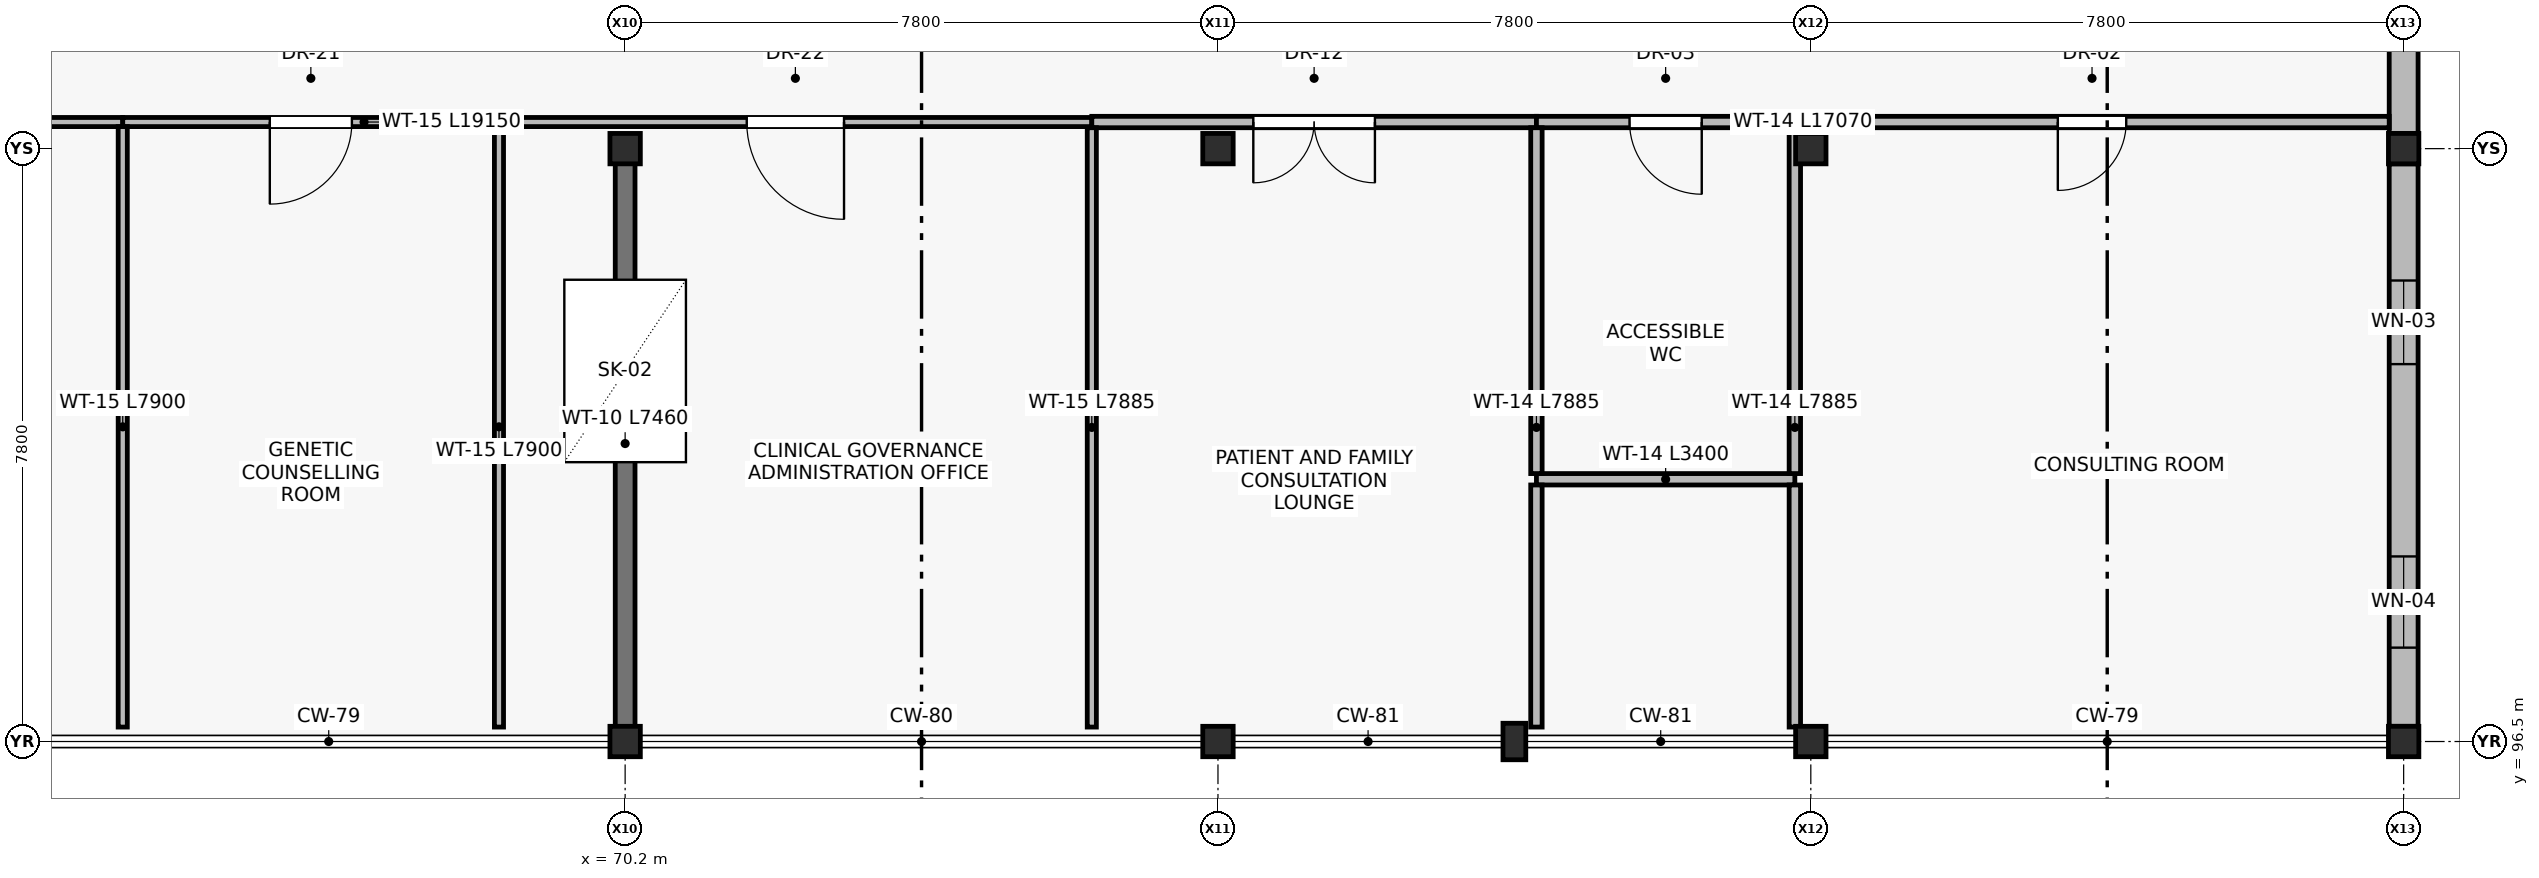
"""IFC4 building model, lengths in metres.
Left out: names, types, materials, properties, quantities, classifications, styles, units other than length and angle.
Written with IfcOpenShell. Run it as: python <this file> out.ifc"""

import sys

from ifc_helpers import new_model, si_unit, direction, frame, frame_2d, origin, origin_2d, place, context, subcontext, project, spatial, rectangle, extrude, element, fill, save


model = new_model("IFC4")
c1 = context("Model", 3, precision=1e-05, world=origin(), true_north=direction((0.0, 1.0)))
c2 = subcontext(c1, "Body", "Model", "MODEL_VIEW")
j1 = project(units=[si_unit("LENGTHUNIT", "METRE"), si_unit("PLANEANGLEUNIT", "RADIAN")], contexts=[c1])
p1 = place(None, origin())
s1 = spatial("IfcSite", under=j1, at=p1, CompositionType="ELEMENT")
p2 = place(p1, origin())
s2 = spatial("IfcBuilding", under=s1, at=p2, CompositionType="ELEMENT")
p3 = place(p2, frame((0.0, 0.0, 23.1)))
s3 = spatial("IfcBuildingStorey", under=s2, at=p3, CompositionType="ELEMENT", Elevation=23.1)
for number, where, z_axis, x_axis in (
    (1, (70.2, 96.5, 0.0), (0.0, 0.0, 1.0), (1.0, 0.0, 0.0)),
    (2, (70.2, 104.3, 0.0), (0.0, 0.0, 1.0), (1.0, 0.0, 0.0)),
    (3, (78.0, 96.5, 0.0), (0.0, 0.0, 1.0), (1.0, 0.0, 0.0)),
    (4, (78.0, 104.3, 0.0), (0.0, 0.0, 1.0), (1.0, 0.0, 0.0)),
    (5, (85.8, 96.5, 0.0), (0.0, 0.0, 1.0), (1.0, 0.0, 0.0)),
    (6, (85.8, 104.3, 0.0), (0.0, 0.0, 1.0), (1.0, 0.0, 0.0)),
    (7, (93.6, 96.5, 0.0), (0.0, 0.0, 1.0), (1.0, 0.0, 0.0)),
    (8, (93.6, 104.3, 0.0), (0.0, 0.0, 1.0), (1.0, 0.0, 0.0)),
):
    element("IfcColumn", number, at=place(p3, frame(where, z_axis=z_axis, x_axis=x_axis)), inside=s3, PredefinedType="COLUMN", context=c2, shape_type="SweptSolid", body=[
        extrude(rectangle(XDim=0.4, YDim=0.4, at=origin_2d()), origin(), (0.0, 0.0, 1.0), 4.2),
    ])
p4 = place(p3, frame((81.9, 96.5, 0.0), z_axis=(0.0, 0.0, 1.0), x_axis=(1.0, 0.0, 0.0)))
e9 = element("IfcColumn", 9, at=p4, inside=s3, PredefinedType="PILASTER", context=c2, shape_type="SweptSolid", body=[
    extrude(rectangle(XDim=0.3, YDim=0.48, at=origin_2d()), origin(), (0.0, 0.0, 1.0), 4.2),
])
p5 = place(p3, frame((93.6, 104.1, 0.0), z_axis=(0.0, 0.0, 1.0), x_axis=(0.0, -1.0, 0.0)))
e10 = element("IfcWall", 10, at=p5, inside=s3, PredefinedType="STANDARD", context=c2, shape_type="SweptSolid", body=[
    extrude(rectangle(XDim=7.4, YDim=0.38, at=frame_2d((3.7, 0.0))), origin(), (0.0, 0.0, 1.0), 3.65),
])
p6 = place(p5, frame((1.535, 0.0, 0.9)))
e11 = element("IfcOpeningElement", 11, at=p6, cuts=e10, PredefinedType="OPENING", context=c2, shape_type="SweptSolid", body=[
    extrude(rectangle(XDim=1.1, YDim=1.6, at=frame_2d((0.55, 0.8))), frame((0.0, 0.2, 0.0), z_axis=(0.0, -1.0, 0.0), x_axis=(1.0, 0.0, 0.0)), (0.0, 0.0, 1.0), 0.4),
])
p7 = place(p5, frame((5.165, 0.0, 0.9)))
e12 = element("IfcOpeningElement", 12, at=p7, cuts=e10, PredefinedType="OPENING", context=c2, shape_type="SweptSolid", body=[
    extrude(rectangle(XDim=1.2, YDim=1.5, at=frame_2d((0.6, 0.75))), frame((0.0, 0.2, 0.0), z_axis=(0.0, -1.0, 0.0), x_axis=(1.0, 0.0, 0.0)), (0.0, 0.0, 1.0), 0.4),
])
p8 = place(p3, frame((93.6, 108.0, 0.0), z_axis=(0.0, 0.0, 1.0), x_axis=(0.0, -1.0, 0.0)))
e13 = element("IfcWall", 13, at=p8, inside=s3, PredefinedType="STANDARD", context=c2, shape_type="SweptSolid", body=[
    extrude(rectangle(XDim=3.5, YDim=0.38, at=frame_2d((1.75, 0.0))), origin(), (0.0, 0.0, 1.0), 3.65),
])
p9 = place(p8, frame((1.15, 0.0, 0.9)))
e14 = element("IfcOpeningElement", 14, at=p9, cuts=e13, PredefinedType="OPENING", context=c2, shape_type="SweptSolid", body=[
    extrude(rectangle(XDim=1.2, YDim=2.1, at=frame_2d((0.6, 1.05))), frame((0.0, 0.2, 0.0), z_axis=(0.0, -1.0, 0.0), x_axis=(1.0, 0.0, 0.0)), (0.0, 0.0, 1.0), 0.4),
])
p10 = place(p3, frame((70.2, 96.69, 0.0), z_axis=(0.0, 0.0, 1.0), x_axis=(0.0, 1.0, 0.0)))
e15 = element("IfcWall", 15, at=p10, inside=s3, PredefinedType="SHEAR", context=c2, shape_type="SweptSolid", body=[
    extrude(rectangle(XDim=7.46, YDim=0.26, at=frame_2d((3.73, 0.0))), origin(), (0.0, 0.0, 1.0), 3.94),
])
p11 = place(p3, frame((63.59, 104.65, 0.0), z_axis=(0.0, 0.0, 1.0), x_axis=(-1.0, 0.0, 0.0)))
e16 = element("IfcWall", 16, at=p11, inside=s3, PredefinedType="PARTITIONING", context=c2, shape_type="SweptSolid", body=[
    extrude(rectangle(XDim=6.4, YDim=0.12, at=frame_2d((3.2, 0.0))), origin(), (0.0, 0.0, 1.0), 3.94),
])
p12 = place(p11, frame((2.74, 0.0, 0.0)))
e17 = element("IfcOpeningElement", 17, at=p12, cuts=e16, PredefinedType="OPENING", context=c2, shape_type="SweptSolid", body=[
    extrude(rectangle(XDim=0.92, YDim=2.15, at=frame_2d((0.46, 1.075))), frame((0.0, 0.07, 0.0), z_axis=(0.0, -1.0, 0.0), x_axis=(1.0, 0.0, 0.0)), (0.0, 0.0, 1.0), 0.14),
])
p13 = place(p3, frame((68.54, 104.65, 0.0), z_axis=(0.0, 0.0, 1.0), x_axis=(-1.0, 0.0, 0.0)))
e18 = element("IfcWall", 18, at=p13, inside=s3, PredefinedType="PARTITIONING", context=c2, shape_type="SweptSolid", body=[
    extrude(rectangle(XDim=4.95, YDim=0.12, at=frame_2d((2.475, 0.0))), origin(), (0.0, 0.0, 1.0), 3.94),
])
p14 = place(p13, frame((1.935, 0.0, 0.0)))
e19 = element("IfcOpeningElement", 19, at=p14, cuts=e18, PredefinedType="OPENING", context=c2, shape_type="SweptSolid", body=[
    extrude(rectangle(XDim=1.08, YDim=2.2, at=frame_2d((0.54, 1.1))), frame((0.0, 0.07, 0.0), z_axis=(0.0, -1.0, 0.0), x_axis=(1.0, 0.0, 0.0)), (0.0, 0.0, 1.0), 0.14),
])
p15 = place(p3, frame((76.34, 104.65, 0.0), z_axis=(0.0, 0.0, 1.0), x_axis=(-1.0, 0.0, 0.0)))
e20 = element("IfcWall", 20, at=p15, inside=s3, PredefinedType="PARTITIONING", context=c2, shape_type="SweptSolid", body=[
    extrude(rectangle(XDim=7.8, YDim=0.12, at=frame_2d((3.9, 0.0))), origin(), (0.0, 0.0, 1.0), 3.94),
])
p16 = place(p15, frame((3.26, 0.0, 0.0)))
e21 = element("IfcOpeningElement", 21, at=p16, cuts=e20, PredefinedType="OPENING", context=c2, shape_type="SweptSolid", body=[
    extrude(rectangle(XDim=1.28, YDim=2.25, at=frame_2d((0.64, 1.125))), frame((0.0, 0.07, 0.0), z_axis=(0.0, -1.0, 0.0), x_axis=(1.0, 0.0, 0.0)), (0.0, 0.0, 1.0), 0.14),
])
p17 = place(p3, frame((82.19, 104.65, 0.0), z_axis=(0.0, 0.0, 1.0), x_axis=(-1.0, 0.0, 0.0)))
e22 = element("IfcWall", 22, at=p17, inside=s3, PredefinedType="PARTITIONING", context=c2, shape_type="SweptSolid", body=[
    extrude(rectangle(XDim=5.85, YDim=0.15, at=frame_2d((2.925, 0.0))), origin(), (0.0, 0.0, 1.0), 3.94),
])
p18 = place(p17, frame((2.125, 0.0, 0.0)))
e23 = element("IfcOpeningElement", 23, at=p18, cuts=e22, PredefinedType="OPENING", context=c2, shape_type="SweptSolid", body=[
    extrude(rectangle(XDim=1.6, YDim=2.2, at=frame_2d((0.8, 1.1))), frame((0.0, 0.085, 0.0), z_axis=(0.0, -1.0, 0.0), x_axis=(1.0, 0.0, 0.0)), (0.0, 0.0, 1.0), 0.17),
])
p19 = place(p3, frame((85.59, 104.65, 0.0), z_axis=(0.0, 0.0, 1.0), x_axis=(-1.0, 0.0, 0.0)))
e24 = element("IfcWall", 24, at=p19, inside=s3, PredefinedType="PARTITIONING", context=c2, shape_type="SweptSolid", body=[
    extrude(rectangle(XDim=3.4, YDim=0.15, at=frame_2d((1.7, 0.0))), origin(), (0.0, 0.0, 1.0), 3.94),
])
p20 = place(p19, frame((1.225, 0.0, 0.0)))
e25 = element("IfcOpeningElement", 25, at=p20, cuts=e24, PredefinedType="OPENING", context=c2, shape_type="SweptSolid", body=[
    extrude(rectangle(XDim=0.95, YDim=2.1, at=frame_2d((0.475, 1.05))), frame((0.0, 0.085, 0.0), z_axis=(0.0, -1.0, 0.0), x_axis=(1.0, 0.0, 0.0)), (0.0, 0.0, 1.0), 0.17),
])
p21 = place(p3, frame((82.19, 99.95, 0.0), z_axis=(0.0, 0.0, 1.0), x_axis=(1.0, 0.0, 0.0)))
e26 = element("IfcWall", 26, at=p21, inside=s3, PredefinedType="PARTITIONING", context=c2, shape_type="SweptSolid", body=[
    extrude(rectangle(XDim=3.4, YDim=0.15, at=frame_2d((1.7, 0.0))), origin(), (0.0, 0.0, 1.0), 3.94),
])
p22 = place(p3, frame((93.41, 104.65, 0.0), z_axis=(0.0, 0.0, 1.0), x_axis=(-1.0, 0.0, 0.0)))
e27 = element("IfcWall", 27, at=p22, inside=s3, PredefinedType="PARTITIONING", context=c2, shape_type="SweptSolid", body=[
    extrude(rectangle(XDim=7.82, YDim=0.15, at=frame_2d((3.91, 0.0))), origin(), (0.0, 0.0, 1.0), 3.94),
])
p23 = place(p22, frame((3.46, 0.0, 0.0)))
e28 = element("IfcOpeningElement", 28, at=p23, cuts=e27, PredefinedType="OPENING", context=c2, shape_type="SweptSolid", body=[
    extrude(rectangle(XDim=0.9, YDim=2.1, at=frame_2d((0.45, 1.05))), frame((0.0, 0.085, 0.0), z_axis=(0.0, -1.0, 0.0), x_axis=(1.0, 0.0, 0.0)), (0.0, 0.0, 1.0), 0.17),
])
for number, where, z_axis, x_axis in (
    (29, (63.59, 96.69, 0.0), (0.0, 0.0, 1.0), (0.0, 1.0, 0.0)),
    (30, (68.54, 96.69, 0.0), (0.0, 0.0, 1.0), (0.0, 1.0, 0.0)),
):
    element("IfcWall", number, at=place(p3, frame(where, z_axis=z_axis, x_axis=x_axis)), inside=s3, PredefinedType="PARTITIONING", context=c2, shape_type="SweptSolid", body=[
        extrude(rectangle(XDim=7.9, YDim=0.12, at=frame_2d((3.95, 0.0))), origin(), (0.0, 0.0, 1.0), 3.94),
    ])
p24 = place(p3, frame((76.34, 96.69, 0.0), z_axis=(0.0, 0.0, 1.0), x_axis=(0.0, 1.0, 0.0)))
e31 = element("IfcWall", 31, at=p24, inside=s3, PredefinedType="PARTITIONING", context=c2, shape_type="SweptSolid", body=[
    extrude(rectangle(XDim=7.885, YDim=0.12, at=frame_2d((3.942, 0.0))), origin(), (0.0, 0.0, 1.0), 3.94),
])
p25 = place(p3, frame((82.19, 96.69, 0.0), z_axis=(0.0, 0.0, 1.0), x_axis=(0.0, 1.0, 0.0)))
e32 = element("IfcWall", 32, at=p25, inside=s3, PredefinedType="PARTITIONING", context=c2, shape_type="SweptSolid", body=[
    extrude(rectangle(XDim=3.185, YDim=0.15, at=frame_2d((1.593, 0.0))), origin(), (0.0, 0.0, 1.0), 3.94),
])
p26 = place(p3, frame((82.19, 100.025, 0.0), z_axis=(0.0, 0.0, 1.0), x_axis=(0.0, 1.0, 0.0)))
e33 = element("IfcWall", 33, at=p26, inside=s3, PredefinedType="PARTITIONING", context=c2, shape_type="SweptSolid", body=[
    extrude(rectangle(XDim=4.55, YDim=0.15, at=frame_2d((2.275, 0.0))), origin(), (0.0, 0.0, 1.0), 3.94),
])
p27 = place(p3, frame((85.59, 100.025, 0.0), z_axis=(0.0, 0.0, 1.0), x_axis=(0.0, 1.0, 0.0)))
e34 = element("IfcWall", 34, at=p27, inside=s3, PredefinedType="PARTITIONING", context=c2, shape_type="SweptSolid", body=[
    extrude(rectangle(XDim=4.55, YDim=0.15, at=frame_2d((2.275, 0.0))), origin(), (0.0, 0.0, 1.0), 3.65),
])
p28 = place(p3, frame((85.59, 96.69, 0.0), z_axis=(0.0, 0.0, 1.0), x_axis=(0.0, 1.0, 0.0)))
e35 = element("IfcWall", 35, at=p28, inside=s3, PredefinedType="PARTITIONING", context=c2, shape_type="SweptSolid", body=[
    extrude(rectangle(XDim=3.185, YDim=0.15, at=frame_2d((1.593, 0.0))), origin(), (0.0, 0.0, 1.0), 3.65),
])
p29 = place(p2, frame((0.0, 0.0, 27.3)))
p30 = place(p29, frame((46.8, 96.5, 0.0), z_axis=(0.0, -0.05530385343, 0.998469570791), x_axis=(1.0, 0.0, 0.0)))
p31 = place(p30, frame((23.4, 4.883, 0.01)))
p32 = place(p31, frame((0.0, 0.0, -0.01)))
e36 = element("IfcWindow", 36, at=p32, inside=s3, PartitioningType="SINGLE_PANEL", PredefinedType="SKYLIGHT", context=c2, shape_type="SweptSolid", body=[
    extrude(rectangle(XDim=1.6, YDim=2.4, at=origin_2d()), origin(), (0.0, 0.0, -1.0), 0.05),
])
p33 = place(p6, origin())
e37 = element("IfcWindow", 37, at=p33, inside=s3, PartitioningType="SINGLE_PANEL", PredefinedType="WINDOW", context=c2, shape_type="SweptSolid", body=[
    extrude(rectangle(XDim=1.1, YDim=1.6, at=frame_2d((0.55, 0.8))), frame((0.0, 0.03, 0.0), z_axis=(0.0, -1.0, 0.0), x_axis=(1.0, 0.0, 0.0)), (0.0, 0.0, 1.0), 0.06),
])
fill(e11, e37)
p34 = place(p7, origin())
e38 = element("IfcWindow", 38, at=p34, inside=s3, PartitioningType="SINGLE_PANEL", PredefinedType="WINDOW", context=c2, shape_type="SweptSolid", body=[
    extrude(rectangle(XDim=1.2, YDim=1.5, at=frame_2d((0.6, 0.75))), frame((0.0, 0.03, 0.0), z_axis=(0.0, -1.0, 0.0), x_axis=(1.0, 0.0, 0.0)), (0.0, 0.0, 1.0), 0.06),
])
fill(e12, e38)
p35 = place(p14, origin())
e39 = element("IfcDoor", 39, at=p35, inside=s3, OperationType="SINGLE_SWING_RIGHT", PredefinedType="DOOR", context=c2, shape_type="SweptSolid", body=[
    extrude(rectangle(XDim=1.08, YDim=2.2, at=frame_2d((0.54, 1.1))), frame((0.0, 0.025, 0.0), z_axis=(0.0, -1.0, 0.0), x_axis=(1.0, 0.0, 0.0)), (0.0, 0.0, 1.0), 0.05),
])
fill(e19, e39)
p36 = place(p16, origin())
e40 = element("IfcDoor", 40, at=p36, inside=s3, OperationType="SINGLE_SWING_LEFT", PredefinedType="DOOR", context=c2, shape_type="SweptSolid", body=[
    extrude(rectangle(XDim=1.28, YDim=2.25, at=frame_2d((0.64, 1.125))), frame((0.0, 0.025, 0.0), z_axis=(0.0, -1.0, 0.0), x_axis=(1.0, 0.0, 0.0)), (0.0, 0.0, 1.0), 0.05),
])
fill(e21, e40)
p37 = place(p18, origin())
e41 = element("IfcDoor", 41, at=p37, inside=s3, OperationType="DOUBLE_DOOR_SINGLE_SWING", PredefinedType="DOOR", context=c2, shape_type="SweptSolid", body=[
    extrude(rectangle(XDim=1.6, YDim=2.2, at=frame_2d((0.8, 1.1))), frame((0.0, 0.025, 0.0), z_axis=(0.0, -1.0, 0.0), x_axis=(1.0, 0.0, 0.0)), (0.0, 0.0, 1.0), 0.05),
])
fill(e23, e41)
p38 = place(p20, origin())
e42 = element("IfcDoor", 42, at=p38, inside=s3, OperationType="SINGLE_SWING_LEFT", PredefinedType="DOOR", context=c2, shape_type="SweptSolid", body=[
    extrude(rectangle(XDim=0.95, YDim=2.1, at=frame_2d((0.475, 1.05))), frame((0.0, 0.025, 0.0), z_axis=(0.0, -1.0, 0.0), x_axis=(1.0, 0.0, 0.0)), (0.0, 0.0, 1.0), 0.05),
])
fill(e25, e42)
p39 = place(p23, origin())
e43 = element("IfcDoor", 43, at=p39, inside=s3, OperationType="SINGLE_SWING_RIGHT", PredefinedType="DOOR", context=c2, shape_type="SweptSolid", body=[
    extrude(rectangle(XDim=0.9, YDim=2.1, at=frame_2d((0.45, 1.05))), frame((0.0, 0.025, 0.0), z_axis=(0.0, -1.0, 0.0), x_axis=(1.0, 0.0, 0.0)), (0.0, 0.0, 1.0), 0.05),
])
fill(e28, e43)
save(model, sys.argv[1])
